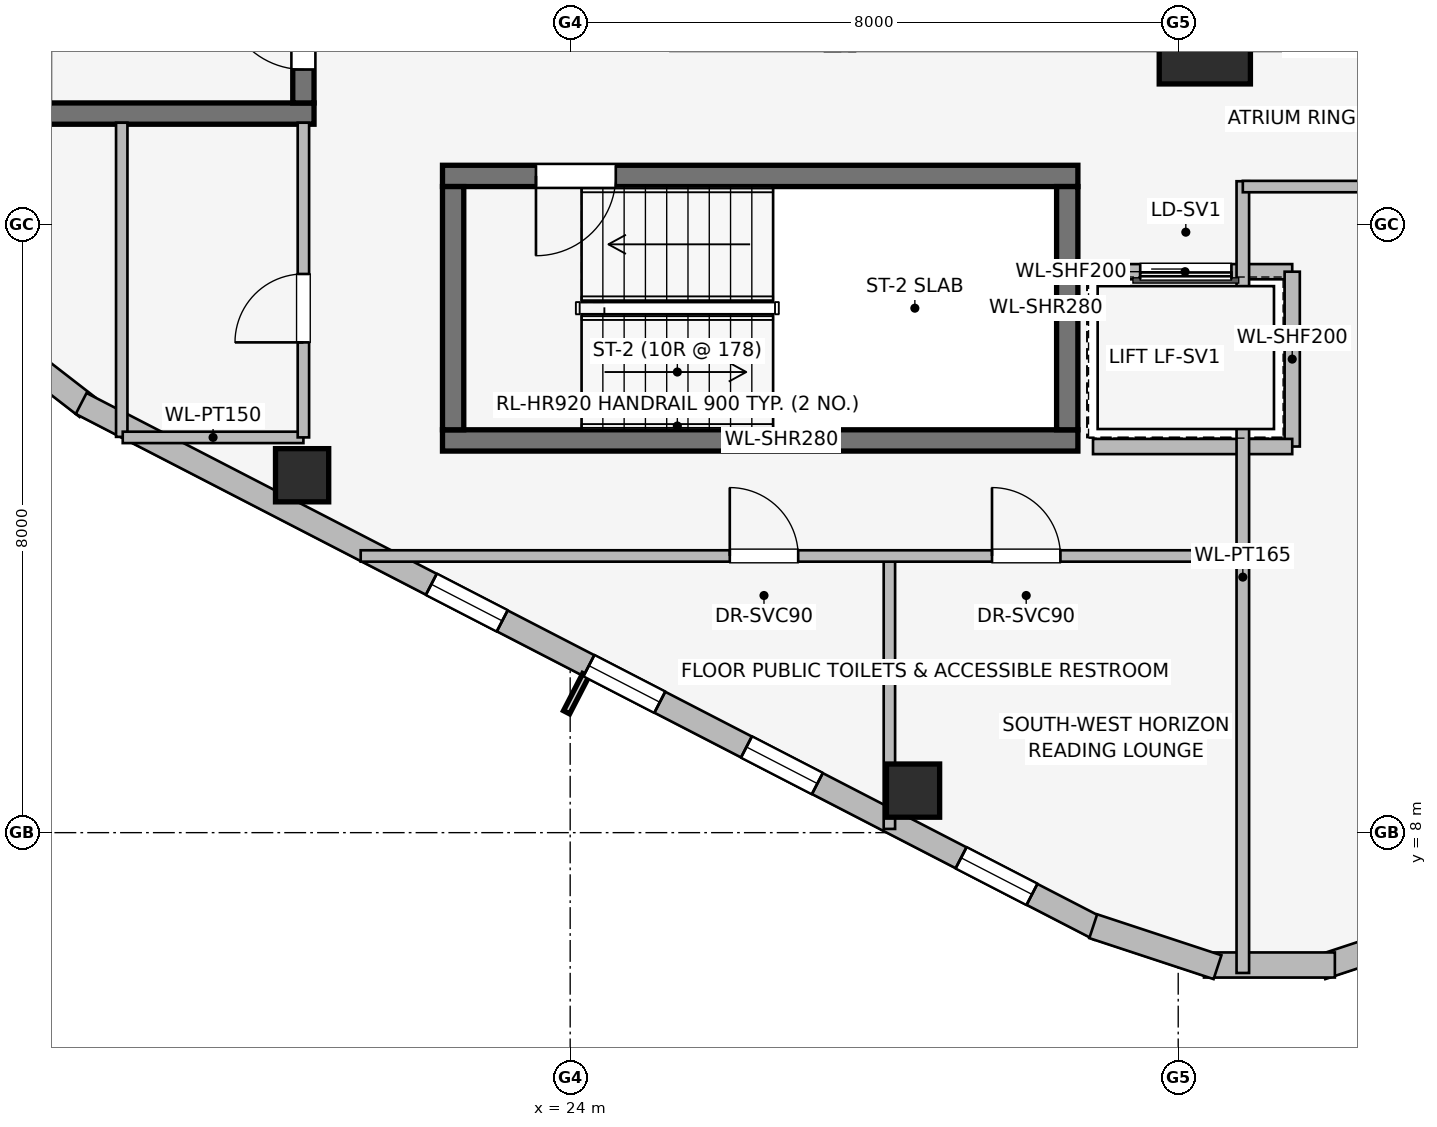
"""IFC4 building model, lengths in metres.
Left out: names, types, materials, properties, quantities, classifications, styles, units other than length and angle.
Written with IfcOpenShell. Run it as: python <this file> out.ifc"""

import sys

from ifc_helpers import new_model, si_unit, direction, frame, frame_2d, origin, origin_2d, place, context, subcontext, project, spatial, rectangle, extrude, element, fill, save


model = new_model("IFC4")
c1 = context("Model", 3, precision=1e-05, world=origin(), true_north=direction((0.0, 1.0)))
c2 = subcontext(c1, "Body", "Model", "MODEL_VIEW")
j1 = project(units=[si_unit("LENGTHUNIT", "METRE"), si_unit("PLANEANGLEUNIT", "RADIAN")], contexts=[c1])
p1 = place(None, origin())
s1 = spatial("IfcSite", under=j1, at=p1, CompositionType="ELEMENT")
p2 = place(p1, origin())
s2 = spatial("IfcBuilding", under=s1, at=p2, CompositionType="ELEMENT")
p3 = place(p2, frame((0.0, 0.0, 220.6)))
s3 = spatial("IfcBuildingStorey", under=s2, at=p3, CompositionType="ELEMENT", Elevation=220.6)
p4 = place(p3, frame((16.87, 17.46, 0.0), z_axis=(0.0, 0.0, 1.0), x_axis=(1.0, 0.0, 0.0)))
e1 = element("IfcWall", 1, at=p4, inside=s3, PredefinedType="SHEAR", context=c2, shape_type="SweptSolid", body=[
    extrude(rectangle(XDim=3.76, YDim=0.28, at=frame_2d((1.88, 0.0))), origin(), (0.0, 0.0, 1.0), 3.55),
])
p5 = place(p3, frame((20.49, 17.6, 0.0), z_axis=(0.0, 0.0, 1.0), x_axis=(0.0, 1.0, 0.0)))
e2 = element("IfcWall", 2, at=p5, inside=s3, PredefinedType="SHEAR", context=c2, shape_type="SweptSolid", body=[
    extrude(rectangle(XDim=7.8, YDim=0.28, at=frame_2d((3.9, 0.0))), origin(), (0.0, 0.0, 1.0), 3.55),
])
p6 = place(p5, frame((0.44, 0.0, 0.0)))
e3 = element("IfcOpeningElement", 3, at=p6, cuts=e2, PredefinedType="OPENING", context=c2, shape_type="SweptSolid", body=[
    extrude(rectangle(XDim=1.05, YDim=2.0, at=frame_2d((0.525, 1.0))), frame((0.0, 0.15, 0.0), z_axis=(0.0, -1.0, 0.0), x_axis=(1.0, 0.0, 0.0)), (0.0, 0.0, 1.0), 0.3),
])
p7 = place(p3, frame((22.32, 13.16, 0.0), z_axis=(0.0, 0.0, 1.0), x_axis=(1.0, 0.0, 0.0)))
e4 = element("IfcWall", 4, at=p7, inside=s3, PredefinedType="SHEAR", context=c2, shape_type="SweptSolid", body=[
    extrude(rectangle(XDim=8.36, YDim=0.28, at=frame_2d((4.18, 0.0))), origin(), (0.0, 0.0, 1.0), 3.55),
])
p8 = place(p3, frame((30.68, 16.64, 0.0), z_axis=(0.0, 0.0, 1.0), x_axis=(-1.0, 0.0, 0.0)))
e5 = element("IfcWall", 5, at=p8, inside=s3, PredefinedType="SHEAR", context=c2, shape_type="SweptSolid", body=[
    extrude(rectangle(XDim=8.36, YDim=0.28, at=frame_2d((4.18, 0.0))), origin(), (0.0, 0.0, 1.0), 3.55),
])
p9 = place(p8, frame((6.08, 0.0, 0.0)))
e6 = element("IfcOpeningElement", 6, at=p9, cuts=e5, PredefinedType="OPENING", context=c2, shape_type="SweptSolid", body=[
    extrude(rectangle(XDim=1.05, YDim=2.0, at=frame_2d((0.525, 1.0))), frame((0.0, 0.15, 0.0), z_axis=(0.0, -1.0, 0.0), x_axis=(1.0, 0.0, 0.0)), (0.0, 0.0, 1.0), 0.3),
])
for number, where, z_axis, x_axis in (
    (7, (22.46, 16.5, 0.0), (0.0, 0.0, 1.0), (0.0, -1.0, 0.0)),
    (8, (30.54, 13.3, 0.0), (0.0, 0.0, 1.0), (0.0, 1.0, 0.0)),
):
    element("IfcWall", number, at=place(p3, frame(where, z_axis=z_axis, x_axis=x_axis)), inside=s3, PredefinedType="SHEAR", context=c2, shape_type="SweptSolid", body=[
        extrude(rectangle(XDim=3.2, YDim=0.28, at=frame_2d((1.6, 0.0))), origin(), (0.0, 0.0, 1.0), 3.55),
    ])
p10 = place(p3, frame((32.35, 18.45, 0.0), z_axis=(0.0, 0.0, 1.0), x_axis=(1.0, 0.0, 0.0)))
e9 = element("IfcColumn", 9, at=p10, inside=s3, PredefinedType="COLUMN", context=c2, shape_type="SweptSolid", body=[
    extrude(rectangle(XDim=1.2, YDim=1.2, at=origin_2d()), origin(), (0.0, 0.0, 1.0), 3.55),
])
for number, where, z_axis, x_axis in (
    (10, (20.473, 12.702, 0.0), (0.0, 0.0, 1.0), (1.0, 0.0, 0.0)),
    (11, (28.511, 8.553, 0.0), (0.0, 0.0, 1.0), (1.0, 0.0, 0.0)),
):
    element("IfcColumn", number, at=place(p3, frame(where, z_axis=z_axis, x_axis=x_axis)), inside=s3, PredefinedType="COLUMN", context=c2, shape_type="SweptSolid", body=[
        extrude(rectangle(XDim=0.7, YDim=0.7, at=origin_2d()), origin(), (0.0, 0.0, 1.0), 3.55),
    ])
p11 = place(p3, frame((17.647, 13.599, 0.0), z_axis=(0.0, 0.0, 1.0), x_axis=(-0.790691856293, 0.61221433207, 0.0)))
e12 = element("IfcWall", 12, at=p11, inside=s3, PredefinedType="STANDARD", context=c2, shape_type="SweptSolid", body=[
    extrude(rectangle(XDim=1.676, YDim=0.33, at=frame_2d((0.838, 0.0))), origin(), (0.0, 0.0, 1.0), 3.29),
])
p12 = place(p3, frame((30.963, 6.73, 0.0), z_axis=(0.0, 0.0, 1.0), x_axis=(-0.888581481622, 0.458718814218, 0.0)))
e13 = element("IfcWall", 13, at=p12, inside=s3, PredefinedType="STANDARD", context=c2, shape_type="SweptSolid", body=[
    extrude(rectangle(XDim=15.077, YDim=0.31, at=frame_2d((7.539, 0.0))), origin(), (0.0, 0.0, 1.0), 3.29),
])
p13 = place(p12, frame((0.998, 0.0, 0.75)))
e14 = element("IfcOpeningElement", 14, at=p13, cuts=e13, PredefinedType="OPENING", context=c2, shape_type="SweptSolid", body=[
    extrude(rectangle(XDim=1.05, YDim=1.4, at=frame_2d((0.525, 0.7))), frame((0.0, 0.165, 0.0), z_axis=(0.0, -1.0, 0.0), x_axis=(1.0, 0.0, 0.0)), (0.0, 0.0, 1.0), 0.33),
])
p14 = place(p12, frame((4.176, 0.0, 0.75)))
e15 = element("IfcOpeningElement", 15, at=p14, cuts=e13, PredefinedType="OPENING", context=c2, shape_type="SweptSolid", body=[
    extrude(rectangle(XDim=1.05, YDim=1.4, at=frame_2d((0.525, 0.7))), frame((0.0, 0.165, 0.0), z_axis=(0.0, -1.0, 0.0), x_axis=(1.0, 0.0, 0.0)), (0.0, 0.0, 1.0), 0.33),
])
p15 = place(p12, frame((6.509, 0.0, 0.75)))
e16 = element("IfcOpeningElement", 16, at=p15, cuts=e13, PredefinedType="OPENING", context=c2, shape_type="SweptSolid", body=[
    extrude(rectangle(XDim=1.05, YDim=1.4, at=frame_2d((0.525, 0.7))), frame((0.0, 0.165, 0.0), z_axis=(0.0, -1.0, 0.0), x_axis=(1.0, 0.0, 0.0)), (0.0, 0.0, 1.0), 0.33),
])
p16 = place(p12, frame((8.842, 0.0, 0.75)))
e17 = element("IfcOpeningElement", 17, at=p16, cuts=e13, PredefinedType="OPENING", context=c2, shape_type="SweptSolid", body=[
    extrude(rectangle(XDim=1.05, YDim=1.4, at=frame_2d((0.525, 0.7))), frame((0.0, 0.165, 0.0), z_axis=(0.0, -1.0, 0.0), x_axis=(1.0, 0.0, 0.0)), (0.0, 0.0, 1.0), 0.33),
])
p17 = place(p3, frame((35.518, 6.769, 0.0), z_axis=(0.0, 0.0, 1.0), x_axis=(-0.949713440491, -0.313120393699, 0.0)))
e18 = element("IfcWall", 18, at=p17, inside=s3, PredefinedType="STANDARD", context=c2, shape_type="SweptSolid", body=[
    extrude(rectangle(XDim=1.722, YDim=0.33, at=frame_2d((0.861, 0.0))), origin(), (0.0, 0.0, 1.0), 3.29),
])
p18 = place(p3, frame((34.061, 6.259, 0.0), z_axis=(0.0, 0.0, 1.0), x_axis=(-1.0, 0.0, 0.0)))
e19 = element("IfcWall", 19, at=p18, inside=s3, PredefinedType="STANDARD", context=c2, shape_type="SweptSolid", body=[
    extrude(rectangle(XDim=1.722, YDim=0.33, at=frame_2d((0.861, 0.0))), origin(), (0.0, 0.0, 1.0), 3.29),
])
p19 = place(p3, frame((32.517, 6.23, 0.0), z_axis=(0.0, 0.0, 1.0), x_axis=(-0.949713440491, 0.313120393699, 0.0)))
e20 = element("IfcWall", 20, at=p19, inside=s3, PredefinedType="STANDARD", context=c2, shape_type="SweptSolid", body=[
    extrude(rectangle(XDim=1.722, YDim=0.33, at=frame_2d((0.861, 0.0))), origin(), (0.0, 0.0, 1.0), 3.29),
])
p20 = place(p3, frame((33.5, 15.38, 0.0), z_axis=(0.0, 0.0, 1.0), x_axis=(-1.0, 0.0, 0.0)))
e21 = element("IfcWall", 21, at=p20, inside=s3, PredefinedType="PARTITIONING", context=c2, shape_type="SweptSolid", body=[
    extrude(rectangle(XDim=2.82, YDim=0.2, at=frame_2d((1.41, 0.0))), origin(), (0.0, 0.0, 1.0), 3.29),
])
p21 = place(p20, frame((0.8, 0.0, 0.0)))
e22 = element("IfcOpeningElement", 22, at=p21, cuts=e21, PredefinedType="OPENING", context=c2, shape_type="SweptSolid", body=[
    extrude(rectangle(XDim=1.2, YDim=2.2, at=frame_2d((0.6, 1.1))), frame((0.0, 0.11, 0.0), z_axis=(0.0, -1.0, 0.0), x_axis=(1.0, 0.0, 0.0)), (0.0, 0.0, 1.0), 0.22),
])
p22 = place(p3, frame((33.5, 13.08, 0.0), z_axis=(0.0, 0.0, 1.0), x_axis=(0.0, 1.0, 0.0)))
e23 = element("IfcWall", 23, at=p22, inside=s3, PredefinedType="PARTITIONING", context=c2, shape_type="SweptSolid", body=[
    extrude(rectangle(XDim=2.3, YDim=0.2, at=frame_2d((1.15, 0.0))), origin(), (0.0, 0.0, 1.0), 3.29),
])
p23 = place(p3, frame((30.879, 13.08, 0.0), z_axis=(0.0, 0.0, 1.0), x_axis=(1.0, 0.0, 0.0)))
e24 = element("IfcWall", 24, at=p23, inside=s3, PredefinedType="PARTITIONING", context=c2, shape_type="SweptSolid", body=[
    extrude(rectangle(XDim=2.621, YDim=0.2, at=frame_2d((1.311, 0.0))), origin(), (0.0, 0.0, 1.0), 3.29),
])
p24 = place(p3, frame((18.1, 17.34, 0.0), z_axis=(0.0, 0.0, 1.0), x_axis=(0.0, -1.0, 0.0)))
e25 = element("IfcWall", 25, at=p24, inside=s3, PredefinedType="PARTITIONING", context=c2, shape_type="SweptSolid", body=[
    extrude(rectangle(XDim=4.133, YDim=0.15, at=frame_2d((2.066, 0.0))), origin(), (0.0, 0.0, 1.0), 3.29),
])
p25 = place(p3, frame((18.113, 13.2, 0.0), z_axis=(0.0, 0.0, 1.0), x_axis=(1.0, 0.0, 0.0)))
e26 = element("IfcWall", 26, at=p25, inside=s3, PredefinedType="PARTITIONING", context=c2, shape_type="SweptSolid", body=[
    extrude(rectangle(XDim=2.377, YDim=0.15, at=frame_2d((1.188, 0.0))), origin(), (0.0, 0.0, 1.0), 3.29),
])
p26 = place(p3, frame((20.49, 13.2, 0.0), z_axis=(0.0, 0.0, 1.0), x_axis=(0.0, 1.0, 0.0)))
e27 = element("IfcWall", 27, at=p26, inside=s3, PredefinedType="PARTITIONING", context=c2, shape_type="SweptSolid", body=[
    extrude(rectangle(XDim=4.14, YDim=0.15, at=frame_2d((2.07, 0.0))), origin(), (0.0, 0.0, 1.0), 3.29),
])
p27 = place(p26, frame((1.25, 0.0, 0.0)))
e28 = element("IfcOpeningElement", 28, at=p27, cuts=e27, PredefinedType="OPENING", context=c2, shape_type="SweptSolid", body=[
    extrude(rectangle(XDim=0.9, YDim=2.0, at=frame_2d((0.45, 1.0))), frame((0.0, 0.085, 0.0), z_axis=(0.0, -1.0, 0.0), x_axis=(1.0, 0.0, 0.0)), (0.0, 0.0, 1.0), 0.17),
])
p28 = place(p3, frame((32.85, 6.154, 0.0), z_axis=(0.0, 0.0, 1.0), x_axis=(0.0, 1.0, 0.0)))
e29 = element("IfcWall", 29, at=p28, inside=s3, PredefinedType="PARTITIONING", context=c2, shape_type="SweptSolid", body=[
    extrude(rectangle(XDim=10.416, YDim=0.165, at=frame_2d((5.208, 0.0))), origin(), (0.0, 0.0, 1.0), 3.29),
])
p29 = place(p3, frame((28.2, 8.049, 0.0), z_axis=(0.0, 0.0, 1.0), x_axis=(0.0, 1.0, 0.0)))
e30 = element("IfcWall", 30, at=p29, inside=s3, PredefinedType="PARTITIONING", context=c2, shape_type="SweptSolid", body=[
    extrude(rectangle(XDim=3.591, YDim=0.15, at=frame_2d((1.795, 0.0))), origin(), (0.0, 0.0, 1.0), 3.29),
])
p30 = place(p3, frame((21.244, 11.64, 0.0), z_axis=(0.0, 0.0, 1.0), x_axis=(1.0, 0.0, 0.0)))
e31 = element("IfcWall", 31, at=p30, inside=s3, PredefinedType="PARTITIONING", context=c2, shape_type="SweptSolid", body=[
    extrude(rectangle(XDim=11.606, YDim=0.15, at=frame_2d((5.803, 0.0))), origin(), (0.0, 0.0, 1.0), 3.29),
])
p31 = place(p30, frame((4.856, 0.0, 0.0)))
e32 = element("IfcOpeningElement", 32, at=p31, cuts=e31, PredefinedType="OPENING", context=c2, shape_type="SweptSolid", body=[
    extrude(rectangle(XDim=0.9, YDim=2.0, at=frame_2d((0.45, 1.0))), frame((0.0, 0.085, 0.0), z_axis=(0.0, -1.0, 0.0), x_axis=(1.0, 0.0, 0.0)), (0.0, 0.0, 1.0), 0.17),
])
p32 = place(p30, frame((8.306, 0.0, 0.0)))
e33 = element("IfcOpeningElement", 33, at=p32, cuts=e31, PredefinedType="OPENING", context=c2, shape_type="SweptSolid", body=[
    extrude(rectangle(XDim=0.9, YDim=2.0, at=frame_2d((0.45, 1.0))), frame((0.0, 0.085, 0.0), z_axis=(0.0, -1.0, 0.0), x_axis=(1.0, 0.0, 0.0)), (0.0, 0.0, 1.0), 0.17),
])
p33 = place(p3, frame((32.85, 16.5, 0.0), z_axis=(0.0, 0.0, 1.0), x_axis=(1.0, 0.0, 0.0)))
e34 = element("IfcWall", 34, at=p33, inside=s3, PredefinedType="PARTITIONING", context=c2, shape_type="SweptSolid", body=[
    extrude(rectangle(XDim=8.61, YDim=0.15, at=frame_2d((4.305, 0.0))), origin(), (0.0, 0.0, 1.0), 3.29),
])
p34 = place(p33, frame((3.825, 0.0, 0.0)))
e35 = element("IfcOpeningElement", 35, at=p34, cuts=e34, PredefinedType="OPENING", context=c2, shape_type="SweptSolid", body=[
    extrude(rectangle(XDim=0.96, YDim=2.0, at=frame_2d((0.48, 1.0))), frame((0.0, 0.085, 0.0), z_axis=(0.0, -1.0, 0.0), x_axis=(1.0, 0.0, 0.0)), (0.0, 0.0, 1.0), 0.17),
])
p35 = place(p13, origin())
e36 = element("IfcWindow", 36, at=p35, inside=s3, PartitioningType="SINGLE_PANEL", PredefinedType="WINDOW", context=c2, shape_type="SweptSolid", body=[
    extrude(rectangle(XDim=1.05, YDim=1.4, at=frame_2d((0.525, 0.7))), frame((0.0, 0.03, 0.0), z_axis=(0.0, -1.0, 0.0), x_axis=(1.0, 0.0, 0.0)), (0.0, 0.0, 1.0), 0.06),
])
fill(e14, e36)
p36 = place(p14, origin())
e37 = element("IfcWindow", 37, at=p36, inside=s3, PartitioningType="SINGLE_PANEL", PredefinedType="WINDOW", context=c2, shape_type="SweptSolid", body=[
    extrude(rectangle(XDim=1.05, YDim=1.4, at=frame_2d((0.525, 0.7))), frame((0.0, 0.03, 0.0), z_axis=(0.0, -1.0, 0.0), x_axis=(1.0, 0.0, 0.0)), (0.0, 0.0, 1.0), 0.06),
])
fill(e15, e37)
p37 = place(p15, origin())
e38 = element("IfcWindow", 38, at=p37, inside=s3, PartitioningType="SINGLE_PANEL", PredefinedType="WINDOW", context=c2, shape_type="SweptSolid", body=[
    extrude(rectangle(XDim=1.05, YDim=1.4, at=frame_2d((0.525, 0.7))), frame((0.0, 0.03, 0.0), z_axis=(0.0, -1.0, 0.0), x_axis=(1.0, 0.0, 0.0)), (0.0, 0.0, 1.0), 0.06),
])
fill(e16, e38)
p38 = place(p16, origin())
e39 = element("IfcWindow", 39, at=p38, inside=s3, PartitioningType="SINGLE_PANEL", PredefinedType="WINDOW", context=c2, shape_type="SweptSolid", body=[
    extrude(rectangle(XDim=1.05, YDim=1.4, at=frame_2d((0.525, 0.7))), frame((0.0, 0.03, 0.0), z_axis=(0.0, -1.0, 0.0), x_axis=(1.0, 0.0, 0.0)), (0.0, 0.0, 1.0), 0.06),
])
fill(e17, e39)
p39 = place(p6, origin())
e40 = element("IfcDoor", 40, at=p39, inside=s3, OperationType="SINGLE_SWING_RIGHT", PredefinedType="DOOR", context=c2, shape_type="SweptSolid", body=[
    extrude(rectangle(XDim=1.05, YDim=2.0, at=frame_2d((0.525, 1.0))), frame((0.0, 0.025, 0.0), z_axis=(0.0, -1.0, 0.0), x_axis=(1.0, 0.0, 0.0)), (0.0, 0.0, 1.0), 0.05),
])
fill(e3, e40)
p40 = place(p9, origin())
e41 = element("IfcDoor", 41, at=p40, inside=s3, OperationType="SINGLE_SWING_RIGHT", PredefinedType="DOOR", context=c2, shape_type="SweptSolid", body=[
    extrude(rectangle(XDim=1.05, YDim=2.0, at=frame_2d((0.525, 1.0))), frame((0.0, 0.025, 0.0), z_axis=(0.0, -1.0, 0.0), x_axis=(1.0, 0.0, 0.0)), (0.0, 0.0, 1.0), 0.05),
])
fill(e6, e41)
p41 = place(p21, origin())
e42 = element("IfcDoor", 42, at=p41, inside=s3, OperationType="SLIDING_TO_RIGHT", PredefinedType="DOOR", context=c2, shape_type="SweptSolid", body=[
    extrude(rectangle(XDim=1.2, YDim=2.2, at=frame_2d((0.6, 1.1))), frame((0.0, 0.025, 0.0), z_axis=(0.0, -1.0, 0.0), x_axis=(1.0, 0.0, 0.0)), (0.0, 0.0, 1.0), 0.05),
])
fill(e22, e42)
p42 = place(p27, origin())
e43 = element("IfcDoor", 43, at=p42, inside=s3, OperationType="SINGLE_SWING_LEFT", PredefinedType="DOOR", context=c2, shape_type="SweptSolid", body=[
    extrude(rectangle(XDim=0.9, YDim=2.0, at=frame_2d((0.45, 1.0))), frame((0.0, 0.025, 0.0), z_axis=(0.0, -1.0, 0.0), x_axis=(1.0, 0.0, 0.0)), (0.0, 0.0, 1.0), 0.05),
])
fill(e28, e43)
p43 = place(p31, origin())
e44 = element("IfcDoor", 44, at=p43, inside=s3, OperationType="SINGLE_SWING_LEFT", PredefinedType="DOOR", context=c2, shape_type="SweptSolid", body=[
    extrude(rectangle(XDim=0.9, YDim=2.0, at=frame_2d((0.45, 1.0))), frame((0.0, 0.025, 0.0), z_axis=(0.0, -1.0, 0.0), x_axis=(1.0, 0.0, 0.0)), (0.0, 0.0, 1.0), 0.05),
])
fill(e32, e44)
p44 = place(p32, origin())
e45 = element("IfcDoor", 45, at=p44, inside=s3, OperationType="SINGLE_SWING_LEFT", PredefinedType="DOOR", context=c2, shape_type="SweptSolid", body=[
    extrude(rectangle(XDim=0.9, YDim=2.0, at=frame_2d((0.45, 1.0))), frame((0.0, 0.025, 0.0), z_axis=(0.0, -1.0, 0.0), x_axis=(1.0, 0.0, 0.0)), (0.0, 0.0, 1.0), 0.05),
])
fill(e33, e45)
save(model, sys.argv[1])
